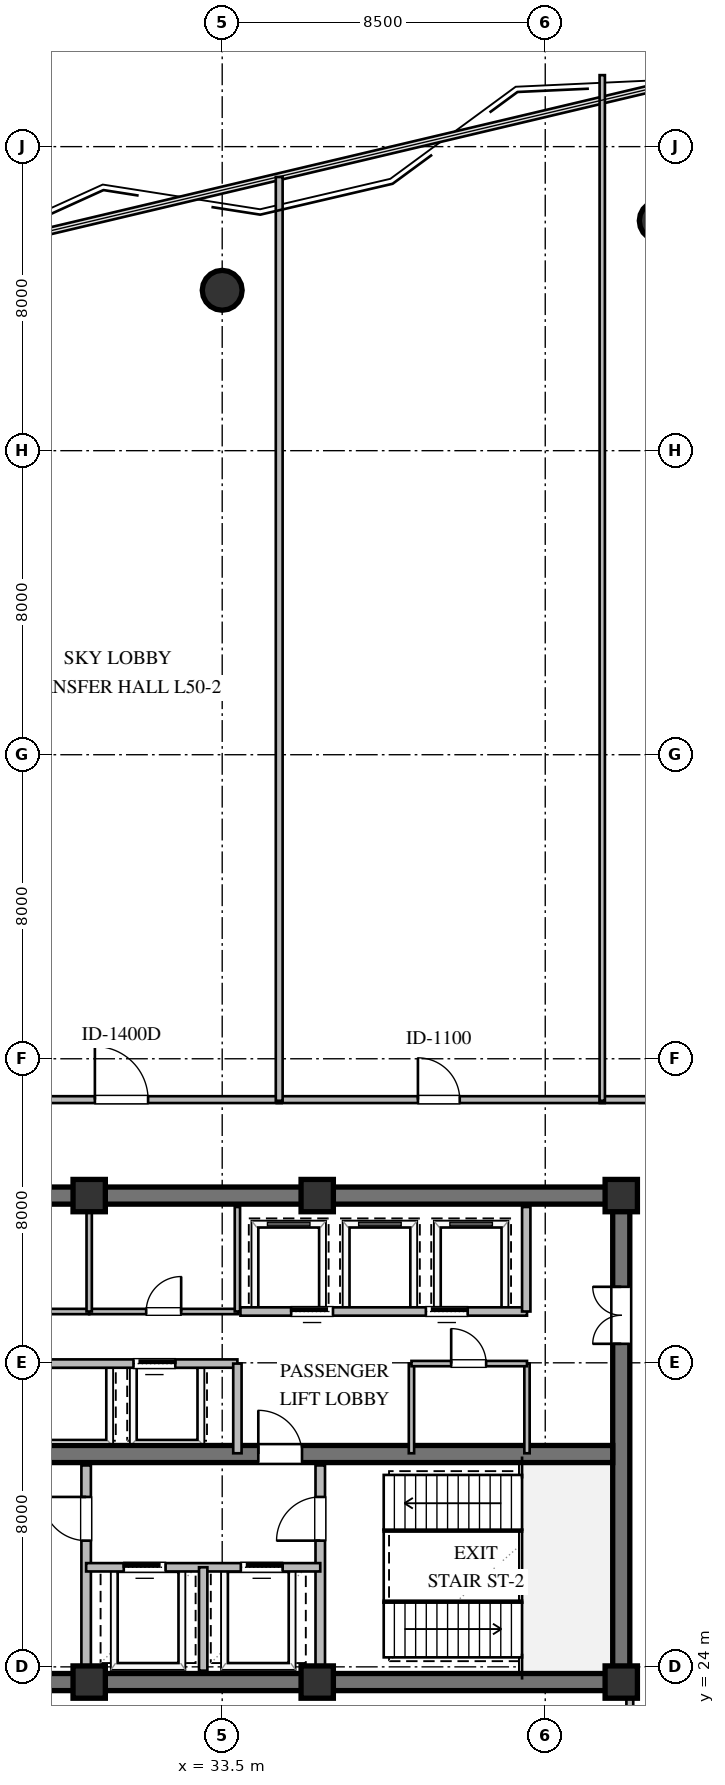
"""IFC4 building model, lengths in metres.
Left out: names, types, materials, properties, quantities, classifications, styles, units other than length and angle.
Written with IfcOpenShell. Run it as: python <this file> out.ifc"""

import sys

from ifc_helpers import new_model, si_unit, direction, frame, frame_2d, origin, origin_2d, place, context, subcontext, project, spatial, rectangle, circle, extrude, element, fill, save


model = new_model("IFC4")
c1 = context("Model", 3, precision=1e-05, world=origin(), true_north=direction((0.0, 1.0)))
c2 = subcontext(c1, "Body", "Model", "MODEL_VIEW")
j1 = project(units=[si_unit("LENGTHUNIT", "METRE"), si_unit("PLANEANGLEUNIT", "RADIAN")], contexts=[c1])
p1 = place(None, origin())
s1 = spatial("IfcSite", under=j1, at=p1, CompositionType="ELEMENT")
p2 = place(p1, origin())
s2 = spatial("IfcBuilding", under=s1, at=p2, CompositionType="ELEMENT")
p3 = place(p2, frame((0.0, 0.0, 190.8)))
s3 = spatial("IfcBuildingStorey", under=s2, at=p3, CompositionType="ELEMENT", Elevation=190.8)
for number, where, z_axis, x_axis in (
    (1, (21.775, 23.6, 0.0), (0.0, 0.0, 1.0), (1.0, 0.0, 0.0)),
    (2, (21.775, 36.4, 0.0), (0.0, 0.0, 1.0), (1.0, 0.0, 0.0)),
):
    element("IfcWall", number, at=place(p3, frame(where, z_axis=z_axis, x_axis=x_axis)), inside=s3, PredefinedType="SHEAR", context=c2, shape_type="SweptSolid", body=[
        extrude(rectangle(XDim=22.45, YDim=0.45, at=frame_2d((11.225, 0.0))), origin(), (0.0, 0.0, 1.0), 4.56),
    ])
p4 = place(p3, frame((44.0, 23.825, 0.0), z_axis=(0.0, 0.0, 1.0), x_axis=(0.0, 1.0, 0.0)))
e3 = element("IfcWall", 3, at=p4, inside=s3, PredefinedType="SHEAR", context=c2, shape_type="SweptSolid", body=[
    extrude(rectangle(XDim=12.35, YDim=0.45, at=frame_2d((6.175, 0.0))), origin(), (0.0, 0.0, 1.0), 4.56),
])
p5 = place(p4, frame((8.675, 0.0, 0.0)))
e4 = element("IfcOpeningElement", 4, at=p5, cuts=e3, PredefinedType="OPENING", context=c2, shape_type="SweptSolid", body=[
    extrude(rectangle(XDim=1.5, YDim=2.15, at=frame_2d((0.75, 1.075))), frame((0.0, 0.235, 0.0), z_axis=(0.0, -1.0, 0.0), x_axis=(1.0, 0.0, 0.0)), (0.0, 0.0, 1.0), 0.47),
])
p6 = place(p3, frame((22.225, 29.6, 0.0), z_axis=(0.0, 0.0, 1.0), x_axis=(1.0, 0.0, 0.0)))
e5 = element("IfcWall", 5, at=p6, inside=s3, PredefinedType="SHEAR", context=c2, shape_type="SweptSolid", body=[
    extrude(rectangle(XDim=21.55, YDim=0.45, at=frame_2d((10.775, 0.0))), origin(), (0.0, 0.0, 1.0), 4.56),
])
p7 = place(p6, frame((12.225, 0.0, 0.0)))
e6 = element("IfcOpeningElement", 6, at=p7, cuts=e5, PredefinedType="OPENING", context=c2, shape_type="SweptSolid", body=[
    extrude(rectangle(XDim=1.15, YDim=2.1, at=frame_2d((0.575, 1.05))), frame((0.0, 0.235, 0.0), z_axis=(0.0, -1.0, 0.0), x_axis=(1.0, 0.0, 0.0)), (0.0, 0.0, 1.0), 0.47),
])
for number, where, z_axis, x_axis in (
    (7, (30.0, 23.6, 0.0), (0.0, 0.0, 1.0), (1.0, 0.0, 0.0)),
    (8, (36.0, 23.6, 0.0), (0.0, 0.0, 1.0), (1.0, 0.0, 0.0)),
    (9, (44.0, 23.6, 0.0), (0.0, 0.0, 1.0), (1.0, 0.0, 0.0)),
    (10, (44.0, 36.4, 0.0), (0.0, 0.0, 1.0), (1.0, 0.0, 0.0)),
    (11, (36.0, 36.4, 0.0), (0.0, 0.0, 1.0), (1.0, 0.0, 0.0)),
    (12, (30.0, 36.4, 0.0), (0.0, 0.0, 1.0), (1.0, 0.0, 0.0)),
):
    element("IfcColumn", number, at=place(p3, frame(where, z_axis=z_axis, x_axis=x_axis)), inside=s3, PredefinedType="COLUMN", context=c2, shape_type="SweptSolid", body=[
        extrude(rectangle(XDim=0.85, YDim=0.85, at=origin_2d()), origin(), (0.0, 0.0, 1.0), 4.8),
    ])
for number, where, z_axis, x_axis in (
    (13, (45.0, 62.05, 0.0), (0.0, 0.0, 1.0), (1.0, 0.0, 0.0)),
    (14, (33.5, 60.22, 0.0), (0.0, 0.0, 1.0), (1.0, 0.0, 0.0)),
):
    element("IfcColumn", number, at=place(p3, frame(where, z_axis=z_axis, x_axis=x_axis)), inside=s3, PredefinedType="COLUMN", context=c2, shape_type="SweptSolid", body=[
        extrude(circle(Radius=0.525, at=origin_2d()), origin(), (0.0, 0.0, 1.0), 4.8),
    ])
p8 = place(p3, frame((29.92, 23.9, 0.0), z_axis=(0.0, 0.0, 1.0), x_axis=(0.0, 1.0, 0.0)))
e15 = element("IfcWall", 15, at=p8, inside=s3, PredefinedType="SOLIDWALL", context=c2, shape_type="SweptSolid", body=[
    extrude(rectangle(XDim=5.4, YDim=0.25, at=frame_2d((2.7, 0.0))), origin(), (0.0, 0.0, 1.0), 4.56),
])
p9 = place(p8, frame((3.421, 0.0, 0.0)))
e16 = element("IfcOpeningElement", 16, at=p9, cuts=e15, PredefinedType="OPENING", context=c2, shape_type="SweptSolid", body=[
    extrude(rectangle(XDim=1.15, YDim=2.1, at=frame_2d((0.575, 1.05))), frame((0.0, 0.135, 0.0), z_axis=(0.0, -1.0, 0.0), x_axis=(1.0, 0.0, 0.0)), (0.0, 0.0, 1.0), 0.27),
])
p10 = place(p3, frame((36.08, 23.9, 0.0), z_axis=(0.0, 0.0, 1.0), x_axis=(0.0, 1.0, 0.0)))
e17 = element("IfcWall", 17, at=p10, inside=s3, PredefinedType="SOLIDWALL", context=c2, shape_type="SweptSolid", body=[
    extrude(rectangle(XDim=5.4, YDim=0.25, at=frame_2d((2.7, 0.0))), origin(), (0.0, 0.0, 1.0), 4.56),
])
p11 = place(p10, frame((3.421, 0.0, 0.0)))
e18 = element("IfcOpeningElement", 18, at=p11, cuts=e17, PredefinedType="OPENING", context=c2, shape_type="SweptSolid", body=[
    extrude(rectangle(XDim=1.15, YDim=2.1, at=frame_2d((0.575, 1.05))), frame((0.0, 0.135, 0.0), z_axis=(0.0, -1.0, 0.0), x_axis=(1.0, 0.0, 0.0)), (0.0, 0.0, 1.0), 0.27),
])
p12 = place(p3, frame((29.92, 26.62, 0.0), z_axis=(0.0, 0.0, 1.0), x_axis=(1.0, 0.0, 0.0)))
e19 = element("IfcWall", 19, at=p12, inside=s3, PredefinedType="SOLIDWALL", context=c2, shape_type="SweptSolid", body=[
    extrude(rectangle(XDim=6.16, YDim=0.22, at=frame_2d((3.08, 0.0))), origin(), (0.0, 0.0, 1.0), 4.56),
])
p13 = place(p12, frame((0.99, 0.0, 0.0)))
e20 = element("IfcOpeningElement", 20, at=p13, cuts=e19, PredefinedType="OPENING", context=c2, shape_type="SweptSolid", body=[
    extrude(rectangle(XDim=1.1, YDim=2.1, at=frame_2d((0.55, 1.05))), frame((0.0, 0.12, 0.0), z_axis=(0.0, -1.0, 0.0), x_axis=(1.0, 0.0, 0.0)), (0.0, 0.0, 1.0), 0.24),
])
p14 = place(p12, frame((4.07, 0.0, 0.0)))
e21 = element("IfcOpeningElement", 21, at=p14, cuts=e19, PredefinedType="OPENING", context=c2, shape_type="SweptSolid", body=[
    extrude(rectangle(XDim=1.1, YDim=2.1, at=frame_2d((0.55, 1.05))), frame((0.0, 0.12, 0.0), z_axis=(0.0, -1.0, 0.0), x_axis=(1.0, 0.0, 0.0)), (0.0, 0.0, 1.0), 0.24),
])
p15 = place(p3, frame((33.0, 23.9, 0.0), z_axis=(0.0, 0.0, 1.0), x_axis=(0.0, 1.0, 0.0)))
e22 = element("IfcWall", 22, at=p15, inside=s3, PredefinedType="SOLIDWALL", context=c2, shape_type="SweptSolid", body=[
    extrude(rectangle(XDim=2.72, YDim=0.22, at=frame_2d((1.36, 0.0))), origin(), (0.0, 0.0, 1.0), 4.56),
])
p16 = place(p3, frame((26.1, 31.98, 0.0), z_axis=(0.0, 0.0, 1.0), x_axis=(1.0, 0.0, 0.0)))
e23 = element("IfcWall", 23, at=p16, inside=s3, PredefinedType="SOLIDWALL", context=c2, shape_type="SweptSolid", body=[
    extrude(rectangle(XDim=7.8, YDim=0.22, at=frame_2d((3.9, 0.0))), origin(), (0.0, 0.0, 1.0), 4.56),
])
p17 = place(p16, frame((1.4, 0.0, 0.0)))
e24 = element("IfcOpeningElement", 24, at=p17, cuts=e23, PredefinedType="OPENING", context=c2, shape_type="SweptSolid", body=[
    extrude(rectangle(XDim=1.1, YDim=2.1, at=frame_2d((0.55, 1.05))), frame((0.0, 0.12, 0.0), z_axis=(0.0, -1.0, 0.0), x_axis=(1.0, 0.0, 0.0)), (0.0, 0.0, 1.0), 0.24),
])
p18 = place(p16, frame((5.066, 0.0, 0.0)))
e25 = element("IfcOpeningElement", 25, at=p18, cuts=e23, PredefinedType="OPENING", context=c2, shape_type="SweptSolid", body=[
    extrude(rectangle(XDim=1.1, YDim=2.1, at=frame_2d((0.55, 1.05))), frame((0.0, 0.12, 0.0), z_axis=(0.0, -1.0, 0.0), x_axis=(1.0, 0.0, 0.0)), (0.0, 0.0, 1.0), 0.24),
])
p19 = place(p3, frame((33.9, 29.62, 0.0), z_axis=(0.0, 0.0, 1.0), x_axis=(0.0, 1.0, 0.0)))
e26 = element("IfcWall", 26, at=p19, inside=s3, PredefinedType="SOLIDWALL", context=c2, shape_type="SweptSolid", body=[
    extrude(rectangle(XDim=2.36, YDim=0.22, at=frame_2d((1.18, 0.0))), origin(), (0.0, 0.0, 1.0), 4.56),
])
p20 = place(p3, frame((26.05, 33.35, 0.0), z_axis=(0.0, 0.0, 1.0), x_axis=(1.0, 0.0, 0.0)))
e27 = element("IfcWall", 27, at=p20, inside=s3, PredefinedType="PARTITIONING", context=c2, shape_type="SweptSolid", body=[
    extrude(rectangle(XDim=3.95, YDim=0.14, at=frame_2d((1.975, 0.0))), origin(), (0.0, 0.0, 1.0), 4.56),
])
p21 = place(p20, frame((1.515, 0.0, 0.0)))
e28 = element("IfcOpeningElement", 28, at=p21, cuts=e27, PredefinedType="OPENING", context=c2, shape_type="SweptSolid", body=[
    extrude(rectangle(XDim=0.92, YDim=2.1, at=frame_2d((0.46, 1.05))), frame((0.0, 0.08, 0.0), z_axis=(0.0, -1.0, 0.0), x_axis=(1.0, 0.0, 0.0)), (0.0, 0.0, 1.0), 0.16),
])
p22 = place(p3, frame((30.0, 33.35, 0.0), z_axis=(0.0, 0.0, 1.0), x_axis=(1.0, 0.0, 0.0)))
e29 = element("IfcWall", 29, at=p22, inside=s3, PredefinedType="PARTITIONING", context=c2, shape_type="SweptSolid", body=[
    extrude(rectangle(XDim=3.92, YDim=0.14, at=frame_2d((1.96, 0.0))), origin(), (0.0, 0.0, 1.0), 4.56),
])
p23 = place(p22, frame((1.5, 0.0, 0.0)))
e30 = element("IfcOpeningElement", 30, at=p23, cuts=e29, PredefinedType="OPENING", context=c2, shape_type="SweptSolid", body=[
    extrude(rectangle(XDim=0.92, YDim=2.1, at=frame_2d((0.46, 1.05))), frame((0.0, 0.08, 0.0), z_axis=(0.0, -1.0, 0.0), x_axis=(1.0, 0.0, 0.0)), (0.0, 0.0, 1.0), 0.16),
])
for number, where, z_axis, x_axis in (
    (31, (30.0, 33.35, 0.0), (0.0, 0.0, 1.0), (0.0, 1.0, 0.0)),
    (32, (33.9, 33.35, 0.0), (0.0, 0.0, 1.0), (0.0, 1.0, 0.0)),
):
    element("IfcWall", number, at=place(p3, frame(where, z_axis=z_axis, x_axis=x_axis)), inside=s3, PredefinedType="PARTITIONING", context=c2, shape_type="SweptSolid", body=[
        extrude(rectangle(XDim=2.75, YDim=0.14, at=frame_2d((1.375, 0.0))), origin(), (0.0, 0.0, 1.0), 4.56),
    ])
p24 = place(p3, frame((33.98, 33.35, 0.0), z_axis=(0.0, 0.0, 1.0), x_axis=(1.0, 0.0, 0.0)))
e33 = element("IfcWall", 33, at=p24, inside=s3, PredefinedType="SOLIDWALL", context=c2, shape_type="SweptSolid", body=[
    extrude(rectangle(XDim=7.54, YDim=0.22, at=frame_2d((3.77, 0.0))), origin(), (0.0, 0.0, 1.0), 4.56),
])
p25 = place(p24, frame((1.335, 0.0, 0.0)))
e34 = element("IfcOpeningElement", 34, at=p25, cuts=e33, PredefinedType="OPENING", context=c2, shape_type="SweptSolid", body=[
    extrude(rectangle(XDim=1.1, YDim=2.1, at=frame_2d((0.55, 1.05))), frame((0.0, 0.12, 0.0), z_axis=(0.0, -1.0, 0.0), x_axis=(1.0, 0.0, 0.0)), (0.0, 0.0, 1.0), 0.24),
])
p26 = place(p24, frame((4.879, 0.0, 0.0)))
e35 = element("IfcOpeningElement", 35, at=p26, cuts=e33, PredefinedType="OPENING", context=c2, shape_type="SweptSolid", body=[
    extrude(rectangle(XDim=1.1, YDim=2.1, at=frame_2d((0.55, 1.05))), frame((0.0, 0.12, 0.0), z_axis=(0.0, -1.0, 0.0), x_axis=(1.0, 0.0, 0.0)), (0.0, 0.0, 1.0), 0.24),
])
p27 = place(p3, frame((41.5, 33.35, 0.0), z_axis=(0.0, 0.0, 1.0), x_axis=(0.0, 1.0, 0.0)))
e36 = element("IfcWall", 36, at=p27, inside=s3, PredefinedType="SOLIDWALL", context=c2, shape_type="SweptSolid", body=[
    extrude(rectangle(XDim=2.75, YDim=0.22, at=frame_2d((1.375, 0.0))), origin(), (0.0, 0.0, 1.0), 4.56),
])
p28 = place(p3, frame((38.48, 29.62, 0.0), z_axis=(0.0, 0.0, 1.0), x_axis=(0.0, 1.0, 0.0)))
e37 = element("IfcWall", 37, at=p28, inside=s3, PredefinedType="PARTITIONING", context=c2, shape_type="SweptSolid", body=[
    extrude(rectangle(XDim=2.36, YDim=0.14, at=frame_2d((1.18, 0.0))), origin(), (0.0, 0.0, 1.0), 4.56),
])
p29 = place(p3, frame((41.52, 29.62, 0.0), z_axis=(0.0, 0.0, 1.0), x_axis=(0.0, 1.0, 0.0)))
e38 = element("IfcWall", 38, at=p29, inside=s3, PredefinedType="PARTITIONING", context=c2, shape_type="SweptSolid", body=[
    extrude(rectangle(XDim=2.36, YDim=0.14, at=frame_2d((1.18, 0.0))), origin(), (0.0, 0.0, 1.0), 1.887),
])
p30 = place(p3, frame((38.48, 31.98, 0.0), z_axis=(0.0, 0.0, 1.0), x_axis=(1.0, 0.0, 0.0)))
e39 = element("IfcWall", 39, at=p30, inside=s3, PredefinedType="PARTITIONING", context=c2, shape_type="SweptSolid", body=[
    extrude(rectangle(XDim=3.04, YDim=0.14, at=frame_2d((1.52, 0.0))), origin(), (0.0, 0.0, 1.0), 4.56),
])
p31 = place(p30, frame((1.045, 0.0, 0.0)))
e40 = element("IfcOpeningElement", 40, at=p31, cuts=e39, PredefinedType="OPENING", context=c2, shape_type="SweptSolid", body=[
    extrude(rectangle(XDim=0.92, YDim=2.1, at=frame_2d((0.46, 1.05))), frame((0.0, 0.08, 0.0), z_axis=(0.0, -1.0, 0.0), x_axis=(1.0, 0.0, 0.0)), (0.0, 0.0, 1.0), 0.16),
])
p32 = place(p3, frame((26.435, 38.925, 0.0), z_axis=(0.0, 0.0, 1.0), x_axis=(1.0, 0.0, 0.0)))
e41 = element("IfcWall", 41, at=p32, inside=s3, PredefinedType="PARTITIONING", context=c2, shape_type="SweptSolid", body=[
    extrude(rectangle(XDim=8.63, YDim=0.18, at=frame_2d((4.315, 0.0))), origin(), (0.0, 0.0, 1.0), 4.56),
])
p33 = place(p32, frame((3.715, 0.0, 0.0)))
e42 = element("IfcOpeningElement", 42, at=p33, cuts=e41, PredefinedType="OPENING", context=c2, shape_type="SweptSolid", body=[
    extrude(rectangle(XDim=1.4, YDim=2.15, at=frame_2d((0.7, 1.075))), frame((0.0, 0.1, 0.0), z_axis=(0.0, -1.0, 0.0), x_axis=(1.0, 0.0, 0.0)), (0.0, 0.0, 1.0), 0.2),
])
p34 = place(p3, frame((34.935, 38.925, 0.0), z_axis=(0.0, 0.0, 1.0), x_axis=(1.0, 0.0, 0.0)))
e43 = element("IfcWall", 43, at=p34, inside=s3, PredefinedType="PARTITIONING", context=c2, shape_type="SweptSolid", body=[
    extrude(rectangle(XDim=8.63, YDim=0.18, at=frame_2d((4.315, 0.0))), origin(), (0.0, 0.0, 1.0), 4.56),
])
p35 = place(p34, frame((3.715, 0.0, 0.0)))
e44 = element("IfcOpeningElement", 44, at=p35, cuts=e43, PredefinedType="OPENING", context=c2, shape_type="SweptSolid", body=[
    extrude(rectangle(XDim=1.1, YDim=2.1, at=frame_2d((0.55, 1.05))), frame((0.0, 0.1, 0.0), z_axis=(0.0, -1.0, 0.0), x_axis=(1.0, 0.0, 0.0)), (0.0, 0.0, 1.0), 0.2),
])
p36 = place(p3, frame((43.435, 38.925, 0.0), z_axis=(0.0, 0.0, 1.0), x_axis=(1.0, 0.0, 0.0)))
e45 = element("IfcWall", 45, at=p36, inside=s3, PredefinedType="PARTITIONING", context=c2, shape_type="SweptSolid", body=[
    extrude(rectangle(XDim=8.63, YDim=0.18, at=frame_2d((4.315, 0.0))), origin(), (0.0, 0.0, 1.0), 4.56),
])
p37 = place(p36, frame((3.715, 0.0, 0.0)))
e46 = element("IfcOpeningElement", 46, at=p37, cuts=e45, PredefinedType="OPENING", context=c2, shape_type="SweptSolid", body=[
    extrude(rectangle(XDim=1.1, YDim=2.1, at=frame_2d((0.55, 1.05))), frame((0.0, 0.1, 0.0), z_axis=(0.0, -1.0, 0.0), x_axis=(1.0, 0.0, 0.0)), (0.0, 0.0, 1.0), 0.2),
])
p38 = place(p3, frame((44.225, 21.47, 0.0), z_axis=(0.0, 0.0, 1.0), x_axis=(0.0, 1.0, 0.0)))
e47 = element("IfcWall", 47, at=p38, inside=s3, PredefinedType="PARTITIONING", context=c2, shape_type="SweptSolid", body=[
    extrude(rectangle(XDim=2.12, YDim=0.18, at=frame_2d((1.06, 0.0))), origin(), (0.0, 0.0, 1.0), 3.7),
])
p39 = place(p3, frame((35.0, 63.201, 0.0), z_axis=(0.0, 0.0, 1.0), x_axis=(0.0, -1.0, 0.0)))
e48 = element("IfcWall", 48, at=p39, inside=s3, PredefinedType="PARTITIONING", context=c2, shape_type="SweptSolid", body=[
    extrude(rectangle(XDim=24.306, YDim=0.18, at=frame_2d((12.153, 0.0))), origin(), (0.0, 0.0, 1.0), 4.006),
])
p40 = place(p3, frame((43.5, 65.881, 0.0), z_axis=(0.0, 0.0, 1.0), x_axis=(0.0, -1.0, 0.0)))
e49 = element("IfcWall", 49, at=p40, inside=s3, PredefinedType="PARTITIONING", context=c2, shape_type="SweptSolid", body=[
    extrude(rectangle(XDim=26.986, YDim=0.14, at=frame_2d((13.493, 0.0))), origin(), (0.0, 0.0, 1.0), 4.006),
])
p41 = place(p9, origin())
e50 = element("IfcDoor", 50, at=p41, inside=s3, OperationType="SINGLE_SWING_RIGHT", PredefinedType="DOOR", context=c2, shape_type="SweptSolid", body=[
    extrude(rectangle(XDim=1.15, YDim=2.1, at=frame_2d((0.575, 1.05))), frame((0.0, 0.025, 0.0), z_axis=(0.0, -1.0, 0.0), x_axis=(1.0, 0.0, 0.0)), (0.0, 0.0, 1.0), 0.05),
])
fill(e16, e50)
p42 = place(p11, origin())
e51 = element("IfcDoor", 51, at=p42, inside=s3, OperationType="SINGLE_SWING_LEFT", PredefinedType="DOOR", context=c2, shape_type="SweptSolid", body=[
    extrude(rectangle(XDim=1.15, YDim=2.1, at=frame_2d((0.575, 1.05))), frame((0.0, 0.025, 0.0), z_axis=(0.0, -1.0, 0.0), x_axis=(1.0, 0.0, 0.0)), (0.0, 0.0, 1.0), 0.05),
])
fill(e18, e51)
p43 = place(p13, origin())
e52 = element("IfcDoor", 52, at=p43, inside=s3, OperationType="SLIDING_TO_LEFT", PredefinedType="DOOR", context=c2, shape_type="SweptSolid", body=[
    extrude(rectangle(XDim=1.1, YDim=2.1, at=frame_2d((0.55, 1.05))), frame((0.0, 0.025, 0.0), z_axis=(0.0, -1.0, 0.0), x_axis=(1.0, 0.0, 0.0)), (0.0, 0.0, 1.0), 0.05),
])
fill(e20, e52)
p44 = place(p14, origin())
e53 = element("IfcDoor", 53, at=p44, inside=s3, OperationType="SLIDING_TO_RIGHT", PredefinedType="DOOR", context=c2, shape_type="SweptSolid", body=[
    extrude(rectangle(XDim=1.1, YDim=2.1, at=frame_2d((0.55, 1.05))), frame((0.0, 0.025, 0.0), z_axis=(0.0, -1.0, 0.0), x_axis=(1.0, 0.0, 0.0)), (0.0, 0.0, 1.0), 0.05),
])
fill(e21, e53)
p45 = place(p7, origin())
e54 = element("IfcDoor", 54, at=p45, inside=s3, OperationType="SINGLE_SWING_LEFT", PredefinedType="DOOR", context=c2, shape_type="SweptSolid", body=[
    extrude(rectangle(XDim=1.15, YDim=2.1, at=frame_2d((0.575, 1.05))), frame((0.0, 0.025, 0.0), z_axis=(0.0, -1.0, 0.0), x_axis=(1.0, 0.0, 0.0)), (0.0, 0.0, 1.0), 0.05),
])
fill(e6, e54)
p46 = place(p5, origin())
e55 = element("IfcDoor", 55, at=p46, inside=s3, OperationType="DOUBLE_DOOR_SINGLE_SWING", PredefinedType="DOOR", context=c2, shape_type="SweptSolid", body=[
    extrude(rectangle(XDim=1.5, YDim=2.15, at=frame_2d((0.75, 1.075))), frame((0.0, 0.025, 0.0), z_axis=(0.0, -1.0, 0.0), x_axis=(1.0, 0.0, 0.0)), (0.0, 0.0, 1.0), 0.05),
])
fill(e4, e55)
p47 = place(p18, origin())
e56 = element("IfcDoor", 56, at=p47, inside=s3, OperationType="SLIDING_TO_RIGHT", PredefinedType="DOOR", context=c2, shape_type="SweptSolid", body=[
    extrude(rectangle(XDim=1.1, YDim=2.1, at=frame_2d((0.55, 1.05))), frame((0.0, 0.025, 0.0), z_axis=(0.0, -1.0, 0.0), x_axis=(1.0, 0.0, 0.0)), (0.0, 0.0, 1.0), 0.05),
])
fill(e25, e56)
p48 = place(p23, origin())
e57 = element("IfcDoor", 57, at=p48, inside=s3, OperationType="SINGLE_SWING_RIGHT", PredefinedType="DOOR", context=c2, shape_type="SweptSolid", body=[
    extrude(rectangle(XDim=0.92, YDim=2.1, at=frame_2d((0.46, 1.05))), frame((0.0, 0.025, 0.0), z_axis=(0.0, -1.0, 0.0), x_axis=(1.0, 0.0, 0.0)), (0.0, 0.0, 1.0), 0.05),
])
fill(e30, e57)
p49 = place(p25, origin())
e58 = element("IfcDoor", 58, at=p49, inside=s3, OperationType="SLIDING_TO_LEFT", PredefinedType="DOOR", context=c2, shape_type="SweptSolid", body=[
    extrude(rectangle(XDim=1.1, YDim=2.1, at=frame_2d((0.55, 1.05))), frame((0.0, 0.025, 0.0), z_axis=(0.0, -1.0, 0.0), x_axis=(1.0, 0.0, 0.0)), (0.0, 0.0, 1.0), 0.05),
])
fill(e34, e58)
p50 = place(p26, origin())
e59 = element("IfcDoor", 59, at=p50, inside=s3, OperationType="SLIDING_TO_RIGHT", PredefinedType="DOOR", context=c2, shape_type="SweptSolid", body=[
    extrude(rectangle(XDim=1.1, YDim=2.1, at=frame_2d((0.55, 1.05))), frame((0.0, 0.025, 0.0), z_axis=(0.0, -1.0, 0.0), x_axis=(1.0, 0.0, 0.0)), (0.0, 0.0, 1.0), 0.05),
])
fill(e35, e59)
p51 = place(p31, origin())
e60 = element("IfcDoor", 60, at=p51, inside=s3, OperationType="SINGLE_SWING_LEFT", PredefinedType="DOOR", context=c2, shape_type="SweptSolid", body=[
    extrude(rectangle(XDim=0.92, YDim=2.1, at=frame_2d((0.46, 1.05))), frame((0.0, 0.025, 0.0), z_axis=(0.0, -1.0, 0.0), x_axis=(1.0, 0.0, 0.0)), (0.0, 0.0, 1.0), 0.05),
])
fill(e40, e60)
p52 = place(p33, origin())
e61 = element("IfcDoor", 61, at=p52, inside=s3, OperationType="SINGLE_SWING_LEFT", PredefinedType="DOOR", context=c2, shape_type="SweptSolid", body=[
    extrude(rectangle(XDim=1.4, YDim=2.15, at=frame_2d((0.7, 1.075))), frame((0.0, 0.025, 0.0), z_axis=(0.0, -1.0, 0.0), x_axis=(1.0, 0.0, 0.0)), (0.0, 0.0, 1.0), 0.05),
])
fill(e42, e61)
p53 = place(p35, origin())
e62 = element("IfcDoor", 62, at=p53, inside=s3, OperationType="SINGLE_SWING_LEFT", PredefinedType="DOOR", context=c2, shape_type="SweptSolid", body=[
    extrude(rectangle(XDim=1.1, YDim=2.1, at=frame_2d((0.55, 1.05))), frame((0.0, 0.025, 0.0), z_axis=(0.0, -1.0, 0.0), x_axis=(1.0, 0.0, 0.0)), (0.0, 0.0, 1.0), 0.05),
])
fill(e44, e62)
save(model, sys.argv[1])
